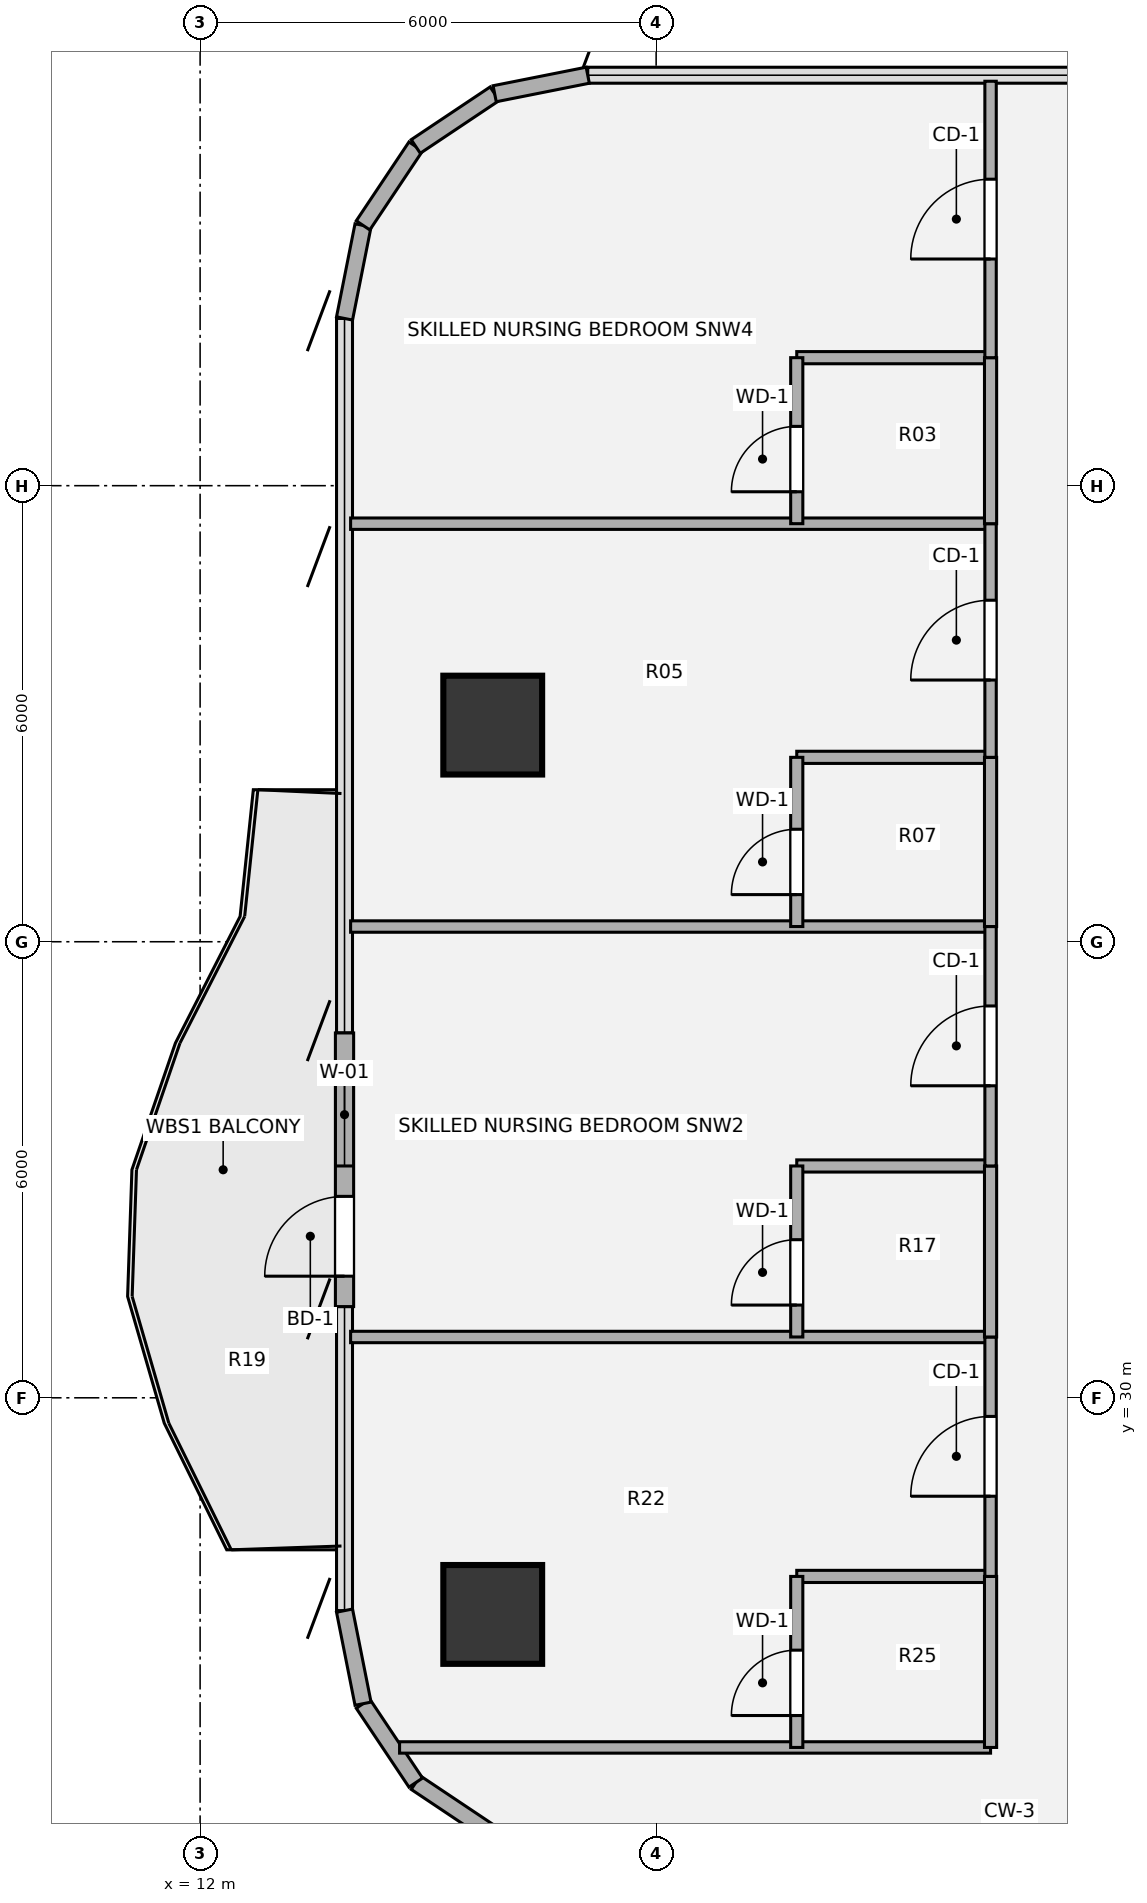
"""IFC4 building model, lengths in metres.
Left out: names, types, materials, properties, quantities, classifications, styles, units other than length and angle.
Written with IfcOpenShell. Run it as: python <this file> out.ifc"""

import sys

from ifc_helpers import new_model, si_unit, direction, frame, frame_2d, origin, origin_2d, place, context, subcontext, project, spatial, rectangle, hollow_circle, extrude, source, transform, mapped, element, fill, save


model = new_model("IFC4")
c1 = context("Model", 3, precision=1e-05, world=origin(), true_north=direction((0.0, 1.0)))
c2 = subcontext(c1, "Body", "Model", "MODEL_VIEW")
j1 = project(units=[si_unit("LENGTHUNIT", "METRE"), si_unit("PLANEANGLEUNIT", "RADIAN")], contexts=[c1])
p1 = place(None, origin())
s1 = spatial("IfcSite", under=j1, at=p1, CompositionType="ELEMENT")
p2 = place(p1, origin())
s2 = spatial("IfcBuilding", under=s1, at=p2, CompositionType="ELEMENT")
p3 = place(p2, frame((0.0, 0.0, 135.18)))
s3 = spatial("IfcBuildingStorey", under=s2, at=p3, CompositionType="ELEMENT", Elevation=135.18)
m1 = source(origin(), c2, "Body", "SweptSolid", [
    extrude(hollow_circle(Radius=0.65, WallThickness=0.045, at=origin_2d()), origin(), (0.0, 0.0, 1.0), 3.78),
])
for number, where, z_axis, x_axis in (
    (1, (15.85, 27.15, 0.0), (0.0, 0.0, 1.0), (1.0, 0.0, 0.0)),
    (2, (15.85, 38.85, 0.0), (0.0, 0.0, 1.0), (1.0, 0.0, 0.0)),
):
    element("IfcColumn", number, at=place(p3, frame(where, z_axis=z_axis, x_axis=x_axis)), inside=s3, PredefinedType="COLUMN", context=c2, shape_type="MappedRepresentation", body=[
        mapped(m1, transform((0.0, 0.0, 0.0), x_axis=(1.0, 0.0, 0.0), y_axis=(0.0, 1.0, 0.0), z_axis=(0.0, 0.0, 1.0), scale=1.0)),
    ])
for number, where, z_axis, x_axis in (
    (3, (15.875, 24.244, 0.0), (0.0, 0.0, 1.0), (-0.831, 0.556, 0.0)),
    (4, (14.837, 24.937, 0.0), (0.0, 0.0, 1.0), (-0.556, 0.831, 0.0)),
    (5, (14.144, 25.975, 0.0), (0.0, 0.0, 1.0), (-0.195, 0.981, 0.0)),
):
    element("IfcWall", number, at=place(p3, frame(where, z_axis=z_axis, x_axis=x_axis)), inside=s3, PredefinedType="SOLIDWALL", context=c2, shape_type="SweptSolid", body=[
        extrude(rectangle(XDim=1.249, YDim=0.215, at=frame_2d((0.624, 0.0))), origin(), (0.0, 0.0, 1.0), 3.53),
    ])
p4 = place(p3, frame((13.9, 31.2, 0.0), z_axis=(0.0, 0.0, 1.0), x_axis=(0.0, 1.0, 0.0)))
e6 = element("IfcWall", 6, at=p4, inside=s3, PredefinedType="SOLIDWALL", context=c2, shape_type="SweptSolid", body=[
    extrude(rectangle(XDim=3.6, YDim=0.24, at=frame_2d((1.8, 0.0))), origin(), (0.0, 0.0, 1.0), 3.53),
])
p5 = place(p4, frame((0.4, 0.0, 0.0)))
e7 = element("IfcOpeningElement", 7, at=p5, cuts=e6, PredefinedType="OPENING", context=c2, shape_type="SweptSolid", body=[
    extrude(rectangle(XDim=1.05, YDim=2.15, at=origin_2d()), frame((0.525, 0.13, 1.075), z_axis=(0.0, -1.0, 0.0), x_axis=(1.0, 0.0, 0.0)), (0.0, 0.0, 1.0), 0.26),
])
p6 = place(p4, frame((1.85, 0.0, 0.85)))
e8 = element("IfcOpeningElement", 8, at=p6, cuts=e6, PredefinedType="OPENING", context=c2, shape_type="SweptSolid", body=[
    extrude(rectangle(XDim=1.35, YDim=1.35, at=origin_2d()), frame((0.675, 0.13, 0.675), z_axis=(0.0, -1.0, 0.0), x_axis=(1.0, 0.0, 0.0)), (0.0, 0.0, 1.0), 0.26),
])
for number, where, z_axis, x_axis in (
    (9, (13.9, 44.2, 0.0), (0.0, 0.0, 1.0), (0.195, 0.981, 0.0)),
    (10, (14.144, 45.425, 0.0), (0.0, 0.0, 1.0), (0.556, 0.831, 0.0)),
    (11, (14.837, 46.463, 0.0), (0.0, 0.0, 1.0), (0.831, 0.556, 0.0)),
    (12, (15.875, 47.156, 0.0), (0.0, 0.0, 1.0), (0.981, 0.195, 0.0)),
):
    element("IfcWall", number, at=place(p3, frame(where, z_axis=z_axis, x_axis=x_axis)), inside=s3, PredefinedType="SOLIDWALL", context=c2, shape_type="SweptSolid", body=[
        extrude(rectangle(XDim=1.249, YDim=0.215, at=frame_2d((0.624, 0.0))), origin(), (0.0, 0.0, 1.0), 3.53),
    ])
p7 = place(p3, frame((14.624, 25.4, 0.0), z_axis=(0.0, 0.0, 1.0), x_axis=(1.0, 0.0, 0.0)))
e13 = element("IfcWall", 13, at=p7, inside=s3, PredefinedType="PARTITIONING", context=c2, shape_type="SweptSolid", body=[
    extrude(rectangle(XDim=7.776, YDim=0.15, at=frame_2d((3.888, 0.0))), origin(), (0.0, 0.0, 1.0), 3.5),
])
p8 = place(p3, frame((19.85, 27.65, 0.0), z_axis=(0.0, 0.0, 1.0), x_axis=(1.0, 0.0, 0.0)))
e14 = element("IfcWall", 14, at=p8, inside=s3, PredefinedType="PLUMBINGWALL", context=c2, shape_type="SweptSolid", body=[
    extrude(rectangle(XDim=2.55, YDim=0.16, at=frame_2d((1.275, 0.0))), origin(), (0.0, 0.0, 1.0), 2.982),
])
p9 = place(p3, frame((13.98, 30.8, 0.0), z_axis=(0.0, 0.0, 1.0), x_axis=(1.0, 0.0, 0.0)))
e15 = element("IfcWall", 15, at=p9, inside=s3, PredefinedType="PARTITIONING", context=c2, shape_type="SweptSolid", body=[
    extrude(rectangle(XDim=8.42, YDim=0.15, at=frame_2d((4.21, 0.0))), origin(), (0.0, 0.0, 1.0), 2.982),
])
p10 = place(p3, frame((19.85, 33.05, 0.0), z_axis=(0.0, 0.0, 1.0), x_axis=(1.0, 0.0, 0.0)))
e16 = element("IfcWall", 16, at=p10, inside=s3, PredefinedType="PLUMBINGWALL", context=c2, shape_type="SweptSolid", body=[
    extrude(rectangle(XDim=2.55, YDim=0.16, at=frame_2d((1.275, 0.0))), origin(), (0.0, 0.0, 1.0), 2.982),
])
p11 = place(p3, frame((13.98, 36.2, 0.0), z_axis=(0.0, 0.0, 1.0), x_axis=(1.0, 0.0, 0.0)))
e17 = element("IfcWall", 17, at=p11, inside=s3, PredefinedType="PARTITIONING", context=c2, shape_type="SweptSolid", body=[
    extrude(rectangle(XDim=8.42, YDim=0.15, at=frame_2d((4.21, 0.0))), origin(), (0.0, 0.0, 1.0), 2.982),
])
p12 = place(p3, frame((19.85, 38.426, 0.0), z_axis=(0.0, 0.0, 1.0), x_axis=(1.0, 0.0, 0.0)))
e18 = element("IfcWall", 18, at=p12, inside=s3, PredefinedType="PLUMBINGWALL", context=c2, shape_type="SweptSolid", body=[
    extrude(rectangle(XDim=2.55, YDim=0.16, at=frame_2d((1.275, 0.0))), origin(), (0.0, 0.0, 1.0), 3.055),
])
p13 = place(p3, frame((13.98, 41.5, 0.0), z_axis=(0.0, 0.0, 1.0), x_axis=(1.0, 0.0, 0.0)))
e19 = element("IfcWall", 19, at=p13, inside=s3, PredefinedType="PARTITIONING", context=c2, shape_type="SweptSolid", body=[
    extrude(rectangle(XDim=8.42, YDim=0.15, at=frame_2d((4.21, 0.0))), origin(), (0.0, 0.0, 1.0), 3.5),
])
p14 = place(p3, frame((19.85, 43.684, 0.0), z_axis=(0.0, 0.0, 1.0), x_axis=(1.0, 0.0, 0.0)))
e20 = element("IfcWall", 20, at=p14, inside=s3, PredefinedType="PLUMBINGWALL", context=c2, shape_type="SweptSolid", body=[
    extrude(rectangle(XDim=2.55, YDim=0.16, at=frame_2d((1.275, 0.0))), origin(), (0.0, 0.0, 1.0), 3.5),
])
p15 = place(p3, frame((19.85, 25.4, 0.0), z_axis=(0.0, 0.0, 1.0), x_axis=(0.0, 1.0, 0.0)))
e21 = element("IfcWall", 21, at=p15, inside=s3, PredefinedType="PLUMBINGWALL", context=c2, shape_type="SweptSolid", body=[
    extrude(rectangle(XDim=2.25, YDim=0.16, at=frame_2d((1.125, 0.0))), origin(), (0.0, 0.0, 1.0), 3.5),
])
p16 = place(p15, frame((0.42, 0.0, 0.0)))
e22 = element("IfcOpeningElement", 22, at=p16, cuts=e21, PredefinedType="OPENING", context=c2, shape_type="SweptSolid", body=[
    extrude(rectangle(XDim=0.86, YDim=2.1, at=origin_2d()), frame((0.43, 0.09, 1.05), z_axis=(0.0, -1.0, 0.0), x_axis=(1.0, 0.0, 0.0)), (0.0, 0.0, 1.0), 0.18),
])
p17 = place(p3, frame((19.85, 30.8, 0.0), z_axis=(0.0, 0.0, 1.0), x_axis=(0.0, 1.0, 0.0)))
e23 = element("IfcWall", 23, at=p17, inside=s3, PredefinedType="PLUMBINGWALL", context=c2, shape_type="SweptSolid", body=[
    extrude(rectangle(XDim=2.25, YDim=0.16, at=frame_2d((1.125, 0.0))), origin(), (0.0, 0.0, 1.0), 3.5),
])
p18 = place(p17, frame((0.42, 0.0, 0.0)))
e24 = element("IfcOpeningElement", 24, at=p18, cuts=e23, PredefinedType="OPENING", context=c2, shape_type="SweptSolid", body=[
    extrude(rectangle(XDim=0.86, YDim=2.1, at=origin_2d()), frame((0.43, 0.09, 1.05), z_axis=(0.0, -1.0, 0.0), x_axis=(1.0, 0.0, 0.0)), (0.0, 0.0, 1.0), 0.18),
])
p19 = place(p3, frame((19.85, 36.2, 0.0), z_axis=(0.0, 0.0, 1.0), x_axis=(0.0, 1.0, 0.0)))
e25 = element("IfcWall", 25, at=p19, inside=s3, PredefinedType="PLUMBINGWALL", context=c2, shape_type="SweptSolid", body=[
    extrude(rectangle(XDim=2.226, YDim=0.16, at=frame_2d((1.113, 0.0))), origin(), (0.0, 0.0, 1.0), 3.5),
])
p20 = place(p19, frame((0.42, 0.0, 0.0)))
e26 = element("IfcOpeningElement", 26, at=p20, cuts=e25, PredefinedType="OPENING", context=c2, shape_type="SweptSolid", body=[
    extrude(rectangle(XDim=0.86, YDim=2.1, at=origin_2d()), frame((0.43, 0.09, 1.05), z_axis=(0.0, -1.0, 0.0), x_axis=(1.0, 0.0, 0.0)), (0.0, 0.0, 1.0), 0.18),
])
p21 = place(p3, frame((19.85, 41.5, 0.0), z_axis=(0.0, 0.0, 1.0), x_axis=(0.0, 1.0, 0.0)))
e27 = element("IfcWall", 27, at=p21, inside=s3, PredefinedType="PLUMBINGWALL", context=c2, shape_type="SweptSolid", body=[
    extrude(rectangle(XDim=2.184, YDim=0.16, at=frame_2d((1.092, 0.0))), origin(), (0.0, 0.0, 1.0), 3.5),
])
p22 = place(p21, frame((0.42, 0.0, 0.0)))
e28 = element("IfcOpeningElement", 28, at=p22, cuts=e27, PredefinedType="OPENING", context=c2, shape_type="SweptSolid", body=[
    extrude(rectangle(XDim=0.86, YDim=2.1, at=origin_2d()), frame((0.43, 0.09, 1.05), z_axis=(0.0, -1.0, 0.0), x_axis=(1.0, 0.0, 0.0)), (0.0, 0.0, 1.0), 0.18),
])
p23 = place(p3, frame((22.4, 25.4, 0.0), z_axis=(0.0, 0.0, 1.0), x_axis=(0.0, 1.0, 0.0)))
e29 = element("IfcWall", 29, at=p23, inside=s3, PredefinedType="PLUMBINGWALL", context=c2, shape_type="SweptSolid", body=[
    extrude(rectangle(XDim=2.25, YDim=0.16, at=frame_2d((1.125, 0.0))), origin(), (0.0, 0.0, 1.0), 3.5),
])
p24 = place(p3, frame((22.4, 27.65, 0.0), z_axis=(0.0, 0.0, 1.0), x_axis=(0.0, 1.0, 0.0)))
e30 = element("IfcWall", 30, at=p24, inside=s3, PredefinedType="PARTITIONING", context=c2, shape_type="SweptSolid", body=[
    extrude(rectangle(XDim=3.15, YDim=0.15, at=frame_2d((1.575, 0.0))), origin(), (0.0, 0.0, 1.0), 3.5),
])
p25 = place(p24, frame((1.055, 0.0, 0.0)))
e31 = element("IfcOpeningElement", 31, at=p25, cuts=e30, PredefinedType="OPENING", context=c2, shape_type="SweptSolid", body=[
    extrude(rectangle(XDim=1.05, YDim=2.1, at=origin_2d()), frame((0.525, 0.085, 1.05), z_axis=(0.0, -1.0, 0.0), x_axis=(1.0, 0.0, 0.0)), (0.0, 0.0, 1.0), 0.17),
])
p26 = place(p3, frame((22.4, 30.8, 0.0), z_axis=(0.0, 0.0, 1.0), x_axis=(0.0, 1.0, 0.0)))
e32 = element("IfcWall", 32, at=p26, inside=s3, PredefinedType="PLUMBINGWALL", context=c2, shape_type="SweptSolid", body=[
    extrude(rectangle(XDim=2.25, YDim=0.16, at=frame_2d((1.125, 0.0))), origin(), (0.0, 0.0, 1.0), 3.5),
])
p27 = place(p3, frame((22.4, 33.05, 0.0), z_axis=(0.0, 0.0, 1.0), x_axis=(0.0, 1.0, 0.0)))
e33 = element("IfcWall", 33, at=p27, inside=s3, PredefinedType="PARTITIONING", context=c2, shape_type="SweptSolid", body=[
    extrude(rectangle(XDim=3.15, YDim=0.15, at=frame_2d((1.575, 0.0))), origin(), (0.0, 0.0, 1.0), 3.5),
])
p28 = place(p27, frame((1.055, 0.0, 0.0)))
e34 = element("IfcOpeningElement", 34, at=p28, cuts=e33, PredefinedType="OPENING", context=c2, shape_type="SweptSolid", body=[
    extrude(rectangle(XDim=1.05, YDim=2.1, at=origin_2d()), frame((0.525, 0.085, 1.05), z_axis=(0.0, -1.0, 0.0), x_axis=(1.0, 0.0, 0.0)), (0.0, 0.0, 1.0), 0.17),
])
p29 = place(p3, frame((22.4, 36.2, 0.0), z_axis=(0.0, 0.0, 1.0), x_axis=(0.0, 1.0, 0.0)))
e35 = element("IfcWall", 35, at=p29, inside=s3, PredefinedType="PLUMBINGWALL", context=c2, shape_type="SweptSolid", body=[
    extrude(rectangle(XDim=2.226, YDim=0.16, at=frame_2d((1.113, 0.0))), origin(), (0.0, 0.0, 1.0), 3.5),
])
p30 = place(p3, frame((22.4, 38.426, 0.0), z_axis=(0.0, 0.0, 1.0), x_axis=(0.0, 1.0, 0.0)))
e36 = element("IfcWall", 36, at=p30, inside=s3, PredefinedType="PARTITIONING", context=c2, shape_type="SweptSolid", body=[
    extrude(rectangle(XDim=3.074, YDim=0.15, at=frame_2d((1.537, 0.0))), origin(), (0.0, 0.0, 1.0), 3.5),
])
p31 = place(p30, frame((1.017, 0.0, 0.0)))
e37 = element("IfcOpeningElement", 37, at=p31, cuts=e36, PredefinedType="OPENING", context=c2, shape_type="SweptSolid", body=[
    extrude(rectangle(XDim=1.05, YDim=2.1, at=origin_2d()), frame((0.525, 0.085, 1.05), z_axis=(0.0, -1.0, 0.0), x_axis=(1.0, 0.0, 0.0)), (0.0, 0.0, 1.0), 0.17),
])
p32 = place(p3, frame((22.4, 41.5, 0.0), z_axis=(0.0, 0.0, 1.0), x_axis=(0.0, 1.0, 0.0)))
e38 = element("IfcWall", 38, at=p32, inside=s3, PredefinedType="PLUMBINGWALL", context=c2, shape_type="SweptSolid", body=[
    extrude(rectangle(XDim=2.184, YDim=0.16, at=frame_2d((1.092, 0.0))), origin(), (0.0, 0.0, 1.0), 3.5),
])
p33 = place(p3, frame((22.4, 43.684, 0.0), z_axis=(0.0, 0.0, 1.0), x_axis=(0.0, 1.0, 0.0)))
e39 = element("IfcWall", 39, at=p33, inside=s3, PredefinedType="PARTITIONING", context=c2, shape_type="SweptSolid", body=[
    extrude(rectangle(XDim=3.637, YDim=0.15, at=frame_2d((1.818, 0.0))), origin(), (0.0, 0.0, 1.0), 3.5),
])
p34 = place(p33, frame((1.298, 0.0, 0.0)))
e40 = element("IfcOpeningElement", 40, at=p34, cuts=e39, PredefinedType="OPENING", context=c2, shape_type="SweptSolid", body=[
    extrude(rectangle(XDim=1.05, YDim=2.1, at=origin_2d()), frame((0.525, 0.085, 1.05), z_axis=(0.0, -1.0, 0.0), x_axis=(1.0, 0.0, 0.0)), (0.0, 0.0, 1.0), 0.17),
])
m2 = source(origin(), c2, "Body", "SweptSolid", [
    extrude(rectangle(XDim=1.05, YDim=2.15, at=origin_2d()), frame((0.525, 0.025, 1.075), z_axis=(0.0, -1.0, 0.0), x_axis=(1.0, 0.0, 0.0)), (0.0, 0.0, 1.0), 0.05),
])
p35 = place(p5, origin())
e41 = element("IfcDoor", 41, at=p35, inside=s3, OperationType="SINGLE_SWING_LEFT", PredefinedType="DOOR", context=c2, shape_type="MappedRepresentation", body=[
    mapped(m2, transform((0.0, 0.0, 0.0), x_axis=(1.0, 0.0, 0.0), y_axis=(0.0, 1.0, 0.0), z_axis=(0.0, 0.0, 1.0), scale=1.0)),
])
fill(e7, e41)
m3 = source(origin(), c2, "Body", "SweptSolid", [
    extrude(rectangle(XDim=1.35, YDim=1.35, at=origin_2d()), frame((0.675, 0.03, 0.675), z_axis=(0.0, -1.0, 0.0), x_axis=(1.0, 0.0, 0.0)), (0.0, 0.0, 1.0), 0.06),
])
p36 = place(p6, origin())
e42 = element("IfcWindow", 42, at=p36, inside=s3, PartitioningType="SINGLE_PANEL", PredefinedType="WINDOW", context=c2, shape_type="MappedRepresentation", body=[
    mapped(m3, transform((0.0, 0.0, 0.0), x_axis=(1.0, 0.0, 0.0), y_axis=(0.0, 1.0, 0.0), z_axis=(0.0, 0.0, 1.0), scale=1.0)),
])
fill(e8, e42)
m4 = source(origin(), c2, "Body", "SweptSolid", [
    extrude(rectangle(XDim=0.86, YDim=2.1, at=origin_2d()), frame((0.43, 0.025, 1.05), z_axis=(0.0, -1.0, 0.0), x_axis=(1.0, 0.0, 0.0)), (0.0, 0.0, 1.0), 0.05),
])
p37 = place(p16, origin())
e43 = element("IfcDoor", 43, at=p37, inside=s3, OperationType="SINGLE_SWING_LEFT", PredefinedType="DOOR", context=c2, shape_type="MappedRepresentation", body=[
    mapped(m4, transform((0.0, 0.0, 0.0), x_axis=(1.0, 0.0, 0.0), y_axis=(0.0, 1.0, 0.0), z_axis=(0.0, 0.0, 1.0), scale=1.0)),
])
fill(e22, e43)
p38 = place(p18, origin())
e44 = element("IfcDoor", 44, at=p38, inside=s3, OperationType="SINGLE_SWING_LEFT", PredefinedType="DOOR", context=c2, shape_type="MappedRepresentation", body=[
    mapped(m4, transform((0.0, 0.0, 0.0), x_axis=(1.0, 0.0, 0.0), y_axis=(0.0, 1.0, 0.0), z_axis=(0.0, 0.0, 1.0), scale=1.0)),
])
fill(e24, e44)
p39 = place(p20, origin())
e45 = element("IfcDoor", 45, at=p39, inside=s3, OperationType="SINGLE_SWING_LEFT", PredefinedType="DOOR", context=c2, shape_type="MappedRepresentation", body=[
    mapped(m4, transform((0.0, 0.0, 0.0), x_axis=(1.0, 0.0, 0.0), y_axis=(0.0, 1.0, 0.0), z_axis=(0.0, 0.0, 1.0), scale=1.0)),
])
fill(e26, e45)
p40 = place(p22, origin())
e46 = element("IfcDoor", 46, at=p40, inside=s3, OperationType="SINGLE_SWING_LEFT", PredefinedType="DOOR", context=c2, shape_type="MappedRepresentation", body=[
    mapped(m4, transform((0.0, 0.0, 0.0), x_axis=(1.0, 0.0, 0.0), y_axis=(0.0, 1.0, 0.0), z_axis=(0.0, 0.0, 1.0), scale=1.0)),
])
fill(e28, e46)
m5 = source(origin(), c2, "Body", "SweptSolid", [
    extrude(rectangle(XDim=1.05, YDim=2.1, at=origin_2d()), frame((0.525, 0.025, 1.05), z_axis=(0.0, -1.0, 0.0), x_axis=(1.0, 0.0, 0.0)), (0.0, 0.0, 1.0), 0.05),
])
p41 = place(p25, origin())
e47 = element("IfcDoor", 47, at=p41, inside=s3, OperationType="SINGLE_SWING_LEFT", PredefinedType="DOOR", context=c2, shape_type="MappedRepresentation", body=[
    mapped(m5, transform((0.0, 0.0, 0.0), x_axis=(1.0, 0.0, 0.0), y_axis=(0.0, 1.0, 0.0), z_axis=(0.0, 0.0, 1.0), scale=1.0)),
])
fill(e31, e47)
p42 = place(p28, origin())
e48 = element("IfcDoor", 48, at=p42, inside=s3, OperationType="SINGLE_SWING_LEFT", PredefinedType="DOOR", context=c2, shape_type="MappedRepresentation", body=[
    mapped(m5, transform((0.0, 0.0, 0.0), x_axis=(1.0, 0.0, 0.0), y_axis=(0.0, 1.0, 0.0), z_axis=(0.0, 0.0, 1.0), scale=1.0)),
])
fill(e34, e48)
p43 = place(p31, origin())
e49 = element("IfcDoor", 49, at=p43, inside=s3, OperationType="SINGLE_SWING_LEFT", PredefinedType="DOOR", context=c2, shape_type="MappedRepresentation", body=[
    mapped(m5, transform((0.0, 0.0, 0.0), x_axis=(1.0, 0.0, 0.0), y_axis=(0.0, 1.0, 0.0), z_axis=(0.0, 0.0, 1.0), scale=1.0)),
])
fill(e37, e49)
p44 = place(p34, origin())
e50 = element("IfcDoor", 50, at=p44, inside=s3, OperationType="SINGLE_SWING_LEFT", PredefinedType="DOOR", context=c2, shape_type="MappedRepresentation", body=[
    mapped(m5, transform((0.0, 0.0, 0.0), x_axis=(1.0, 0.0, 0.0), y_axis=(0.0, 1.0, 0.0), z_axis=(0.0, 0.0, 1.0), scale=1.0)),
])
fill(e40, e50)
save(model, sys.argv[1])
